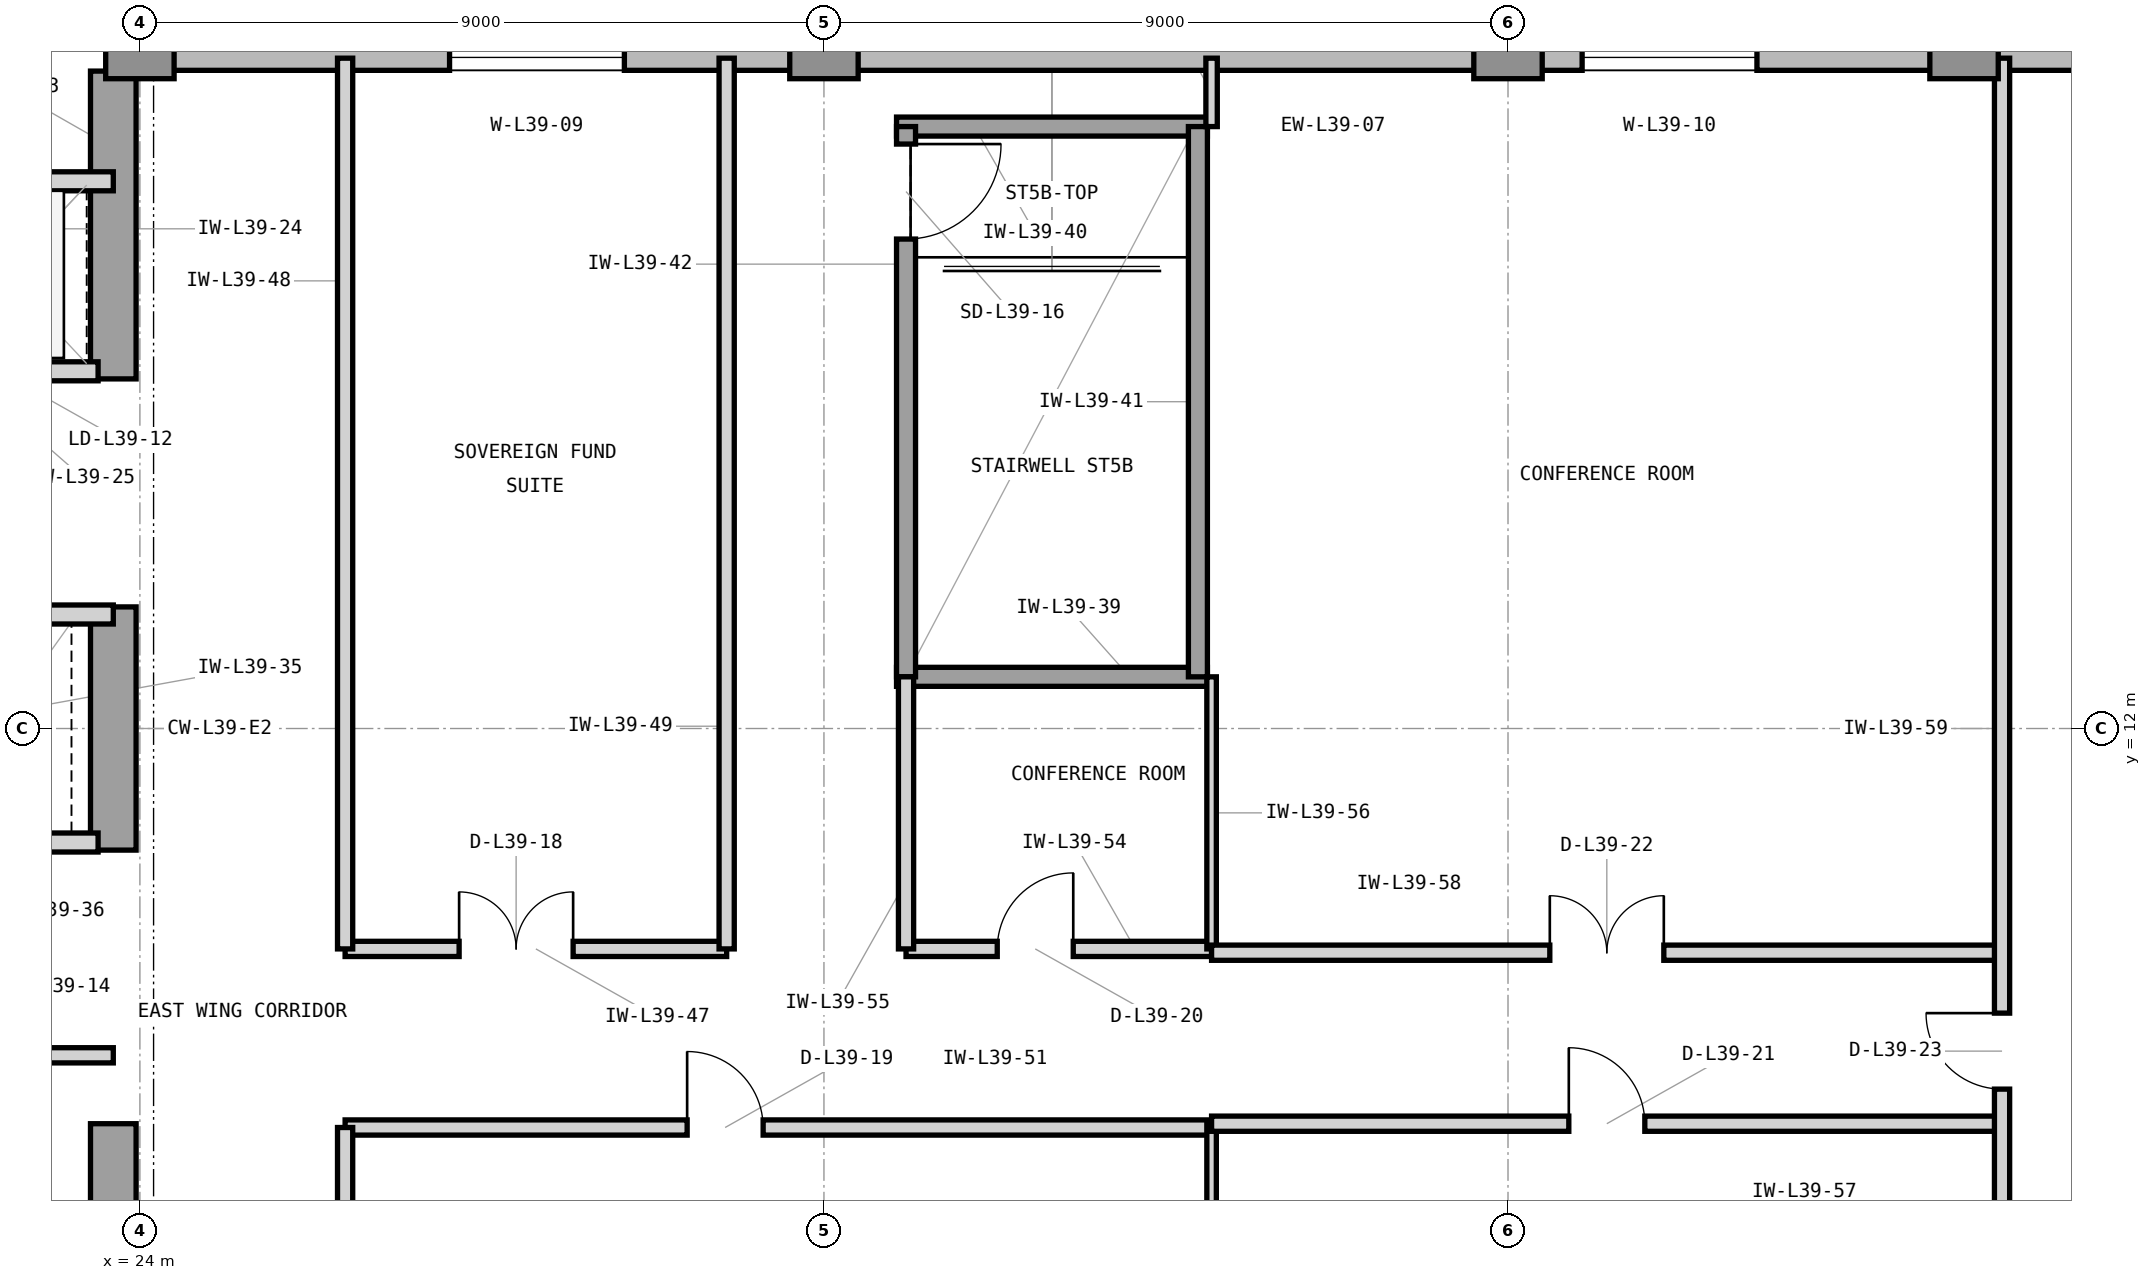
"""IFC4 building model, lengths in metres.
Left out: names, types, materials, properties, quantities, classifications, styles, units other than length and angle.
Written with IfcOpenShell. Run it as: python <this file> out.ifc"""

import sys

from ifc_helpers import new_model, si_unit, direction, frame, frame_2d, origin, origin_2d, place, context, subcontext, project, spatial, rectangle, extrude, element, fill, save


model = new_model("IFC4")
c1 = context("Model", 3, precision=1e-05, world=origin(), true_north=direction((0.0, 1.0)))
c2 = subcontext(c1, "Body", "Model", "MODEL_VIEW")
j1 = project(units=[si_unit("LENGTHUNIT", "METRE"), si_unit("PLANEANGLEUNIT", "RADIAN")], contexts=[c1])
p1 = place(None, origin())
s1 = spatial("IfcSite", under=j1, at=p1, CompositionType="ELEMENT")
p2 = place(p1, origin())
s2 = spatial("IfcBuilding", under=s1, at=p2, CompositionType="ELEMENT")
p3 = place(p2, frame((0.0, 0.0, 164.4)))
s3 = spatial("IfcBuildingStorey", under=s2, at=p3, CompositionType="ELEMENT", Elevation=164.4)
p4 = place(p3, frame((23.65, 3.65, 0.0), z_axis=(0.0, 0.0, 1.0), x_axis=(0.0, 1.0, 0.0)))
e1 = element("IfcWall", 1, at=p4, inside=s3, PredefinedType="SHEAR", context=c2, shape_type="SweptSolid", body=[
    extrude(rectangle(XDim=3.15, YDim=0.6, at=frame_2d((1.575, 0.0))), origin(), (0.0, 0.0, 1.0), 3.9),
])
p5 = place(p3, frame((23.65, 10.4, 0.0), z_axis=(0.0, 0.0, 1.0), x_axis=(0.0, 1.0, 0.0)))
e2 = element("IfcWall", 2, at=p5, inside=s3, PredefinedType="SHEAR", context=c2, shape_type="SweptSolid", body=[
    extrude(rectangle(XDim=3.2, YDim=0.6, at=frame_2d((1.6, 0.0))), origin(), (0.0, 0.0, 1.0), 3.9),
])
p6 = place(p3, frame((23.65, 16.6, 0.0), z_axis=(0.0, 0.0, 1.0), x_axis=(0.0, 1.0, 0.0)))
e3 = element("IfcWall", 3, at=p6, inside=s3, PredefinedType="SHEAR", context=c2, shape_type="SweptSolid", body=[
    extrude(rectangle(XDim=4.05, YDim=0.6, at=frame_2d((2.025, 0.0))), origin(), (0.0, 0.0, 1.0), 3.9),
])
for number, where, z_axis, x_axis in (
    (4, (24.0, 21.0, 0.0), (0.0, 0.0, 1.0), (1.0, 0.0, 0.0)),
    (5, (33.0, 21.0, 0.0), (0.0, 0.0, 1.0), (1.0, 0.0, 0.0)),
    (6, (42.0, 21.0, 0.0), (0.0, 0.0, 1.0), (1.0, 0.0, 0.0)),
    (7, (48.0, 21.0, 0.0), (0.0, 0.0, 1.0), (1.0, 0.0, 0.0)),
):
    element("IfcColumn", number, at=place(p3, frame(where, z_axis=z_axis, x_axis=x_axis)), inside=s3, PredefinedType="COLUMN", context=c2, shape_type="SweptSolid", body=[
        extrude(rectangle(XDim=0.9, YDim=0.9, at=origin_2d()), origin(), (0.0, 0.0, 1.0), 3.9),
    ])
p7 = place(p3, frame((55.4, 20.83, 0.0), z_axis=(0.0, 0.0, 1.0), x_axis=(-1.0, 0.0, 0.0)))
e8 = element("IfcWall", 8, at=p7, inside=s3, PredefinedType="STANDARD", context=c2, shape_type="SweptSolid", body=[
    extrude(rectangle(XDim=31.4, YDim=0.34, at=frame_2d((15.7, 0.0))), origin(), (0.0, 0.0, 1.0), 3.7),
])
p8 = place(p7, frame((25.026, 0.0, 0.9)))
e9 = element("IfcOpeningElement", 9, at=p8, cuts=e8, PredefinedType="OPENING", context=c2, shape_type="SweptSolid", body=[
    extrude(rectangle(XDim=2.3, YDim=2.2, at=frame_2d((1.15, 1.1))), frame((0.0, 0.18, 0.0), z_axis=(0.0, -1.0, 0.0), x_axis=(1.0, 0.0, 0.0)), (0.0, 0.0, 1.0), 0.36),
])
p9 = place(p7, frame((10.125, 0.0, 0.9)))
e10 = element("IfcOpeningElement", 10, at=p9, cuts=e8, PredefinedType="OPENING", context=c2, shape_type="SweptSolid", body=[
    extrude(rectangle(XDim=2.3, YDim=2.2, at=frame_2d((1.15, 1.1))), frame((0.0, 0.18, 0.0), z_axis=(0.0, -1.0, 0.0), x_axis=(1.0, 0.0, 0.0)), (0.0, 0.0, 1.0), 0.36),
])
p10 = place(p3, frame((21.05, 16.7, 0.0), z_axis=(0.0, 0.0, 1.0), x_axis=(1.0, 0.0, 0.0)))
e11 = element("IfcWall", 11, at=p10, inside=s3, PredefinedType="PARTITIONING", context=c2, shape_type="SweptSolid", body=[
    extrude(rectangle(XDim=2.4, YDim=0.25, at=frame_2d((1.2, 0.0))), origin(), (0.0, 0.0, 1.0), 3.283),
])
p11 = place(p10, frame((0.52, 0.0, 0.0)))
e12 = element("IfcOpeningElement", 12, at=p11, cuts=e11, PredefinedType="OPENING", context=c2, shape_type="SweptSolid", body=[
    extrude(rectangle(XDim=1.15, YDim=2.25, at=frame_2d((0.575, 1.125))), frame((0.0, 0.135, 0.0), z_axis=(0.0, -1.0, 0.0), x_axis=(1.0, 0.0, 0.0)), (0.0, 0.0, 1.0), 0.27),
])
p12 = place(p3, frame((16.45, 19.2, 0.0), z_axis=(0.0, 0.0, 1.0), x_axis=(1.0, 0.0, 0.0)))
e13 = element("IfcWall", 13, at=p12, inside=s3, PredefinedType="PARTITIONING", context=c2, shape_type="SweptSolid", body=[
    extrude(rectangle(XDim=7.2, YDim=0.25, at=frame_2d((3.6, 0.0))), origin(), (0.0, 0.0, 1.0), 3.69),
])
p13 = place(p3, frame((19.15, 7.7, 0.0), z_axis=(0.0, 0.0, 1.0), x_axis=(1.0, 0.0, 0.0)))
e14 = element("IfcWall", 14, at=p13, inside=s3, PredefinedType="PARTITIONING", context=c2, shape_type="SweptSolid", body=[
    extrude(rectangle(XDim=4.5, YDim=0.2, at=frame_2d((2.25, 0.0))), origin(), (0.0, 0.0, 1.0), 3.69),
])
p14 = place(p13, frame((1.75, 0.0, 0.0)))
e15 = element("IfcOpeningElement", 15, at=p14, cuts=e14, PredefinedType="OPENING", context=c2, shape_type="SweptSolid", body=[
    extrude(rectangle(XDim=1.0, YDim=2.15, at=frame_2d((0.5, 1.075))), frame((0.0, 0.11, 0.0), z_axis=(0.0, -1.0, 0.0), x_axis=(1.0, 0.0, 0.0)), (0.0, 0.0, 1.0), 0.22),
])
p15 = place(p3, frame((21.05, 10.5, 0.0), z_axis=(0.0, 0.0, 1.0), x_axis=(1.0, 0.0, 0.0)))
e16 = element("IfcWall", 16, at=p15, inside=s3, PredefinedType="PARTITIONING", context=c2, shape_type="SweptSolid", body=[
    extrude(rectangle(XDim=2.4, YDim=0.25, at=frame_2d((1.2, 0.0))), origin(), (0.0, 0.0, 1.0), 3.283),
])
p16 = place(p3, frame((14.7, 13.5, 0.0), z_axis=(0.0, 0.0, 1.0), x_axis=(1.0, 0.0, 0.0)))
e17 = element("IfcWall", 17, at=p16, inside=s3, PredefinedType="PARTITIONING", context=c2, shape_type="SweptSolid", body=[
    extrude(rectangle(XDim=8.95, YDim=0.25, at=frame_2d((4.475, 0.0))), origin(), (0.0, 0.0, 1.0), 3.283),
])
for number, where, z_axis, x_axis in (
    (18, (33.955, 12.68, 0.0), (0.0, 0.0, 1.0), (1.0, 0.0, 0.0)),
    (19, (33.955, 19.92, 0.0), (0.0, 0.0, 1.0), (1.0, 0.0, 0.0)),
):
    element("IfcWall", number, at=place(p3, frame(where, z_axis=z_axis, x_axis=x_axis)), inside=s3, PredefinedType="SHEAR", context=c2, shape_type="SweptSolid", body=[
        extrude(rectangle(XDim=4.09, YDim=0.25, at=frame_2d((2.045, 0.0))), origin(), (0.0, 0.0, 1.0), 3.9),
    ])
p17 = place(p3, frame((37.92, 12.68, 0.0), z_axis=(0.0, 0.0, 1.0), x_axis=(0.0, 1.0, 0.0)))
e20 = element("IfcWall", 20, at=p17, inside=s3, PredefinedType="SHEAR", context=c2, shape_type="SweptSolid", body=[
    extrude(rectangle(XDim=7.24, YDim=0.25, at=frame_2d((3.62, 0.0))), origin(), (0.0, 0.0, 1.0), 3.9),
])
p18 = place(p3, frame((34.08, 12.68, 0.0), z_axis=(0.0, 0.0, 1.0), x_axis=(0.0, 1.0, 0.0)))
e21 = element("IfcWall", 21, at=p18, inside=s3, PredefinedType="SHEAR", context=c2, shape_type="SweptSolid", body=[
    extrude(rectangle(XDim=7.24, YDim=0.25, at=frame_2d((3.62, 0.0))), origin(), (0.0, 0.0, 1.0), 3.9),
])
p19 = place(p18, frame((5.76, 0.0, 0.0)))
e22 = element("IfcOpeningElement", 22, at=p19, cuts=e21, PredefinedType="OPENING", context=c2, shape_type="SweptSolid", body=[
    extrude(rectangle(XDim=1.25, YDim=2.2, at=frame_2d((0.625, 1.1))), frame((0.0, 0.135, 0.0), z_axis=(0.0, -1.0, 0.0), x_axis=(1.0, 0.0, 0.0)), (0.0, 0.0, 1.0), 0.27),
])
p20 = place(p3, frame((26.7, 9.1, 0.0), z_axis=(0.0, 0.0, 1.0), x_axis=(1.0, 0.0, 0.0)))
e23 = element("IfcWall", 23, at=p20, inside=s3, PredefinedType="PARTITIONING", context=c2, shape_type="SweptSolid", body=[
    extrude(rectangle(XDim=5.02, YDim=0.2, at=frame_2d((2.51, 0.0))), origin(), (0.0, 0.0, 1.0), 3.69),
])
p21 = place(p20, frame((1.5, 0.0, 0.0)))
e24 = element("IfcOpeningElement", 24, at=p21, cuts=e23, PredefinedType="OPENING", context=c2, shape_type="SweptSolid", body=[
    extrude(rectangle(XDim=1.5, YDim=2.3, at=frame_2d((0.75, 1.15))), frame((0.0, 0.11, 0.0), z_axis=(0.0, -1.0, 0.0), x_axis=(1.0, 0.0, 0.0)), (0.0, 0.0, 1.0), 0.22),
])
for number, where, z_axis, x_axis in (
    (25, (26.7, 9.1, 0.0), (0.0, 0.0, 1.0), (0.0, 1.0, 0.0)),
    (26, (31.72, 9.1, 0.0), (0.0, 0.0, 1.0), (0.0, 1.0, 0.0)),
):
    element("IfcWall", number, at=place(p3, frame(where, z_axis=z_axis, x_axis=x_axis)), inside=s3, PredefinedType="PARTITIONING", context=c2, shape_type="SweptSolid", body=[
        extrude(rectangle(XDim=11.72, YDim=0.2, at=frame_2d((5.86, 0.0))), origin(), (0.0, 0.0, 1.0), 3.69),
    ])
p22 = place(p3, frame((38.1, 19.92, 0.0), z_axis=(0.0, 0.0, 1.0), x_axis=(0.0, 1.0, 0.0)))
e27 = element("IfcWall", 27, at=p22, inside=s3, PredefinedType="PARTITIONING", context=c2, shape_type="SweptSolid", body=[
    extrude(rectangle(XDim=0.9, YDim=0.15, at=frame_2d((0.45, 0.0))), origin(), (0.0, 0.0, 1.0), 3.69),
])
p23 = place(p3, frame((26.7, 6.75, 0.0), z_axis=(0.0, 0.0, 1.0), x_axis=(1.0, 0.0, 0.0)))
e28 = element("IfcWall", 28, at=p23, inside=s3, PredefinedType="PARTITIONING", context=c2, shape_type="SweptSolid", body=[
    extrude(rectangle(XDim=11.4, YDim=0.2, at=frame_2d((5.7, 0.0))), origin(), (0.0, 0.0, 1.0), 3.69),
])
p24 = place(p23, frame((4.5, 0.0, 0.0)))
e29 = element("IfcOpeningElement", 29, at=p24, cuts=e28, PredefinedType="OPENING", context=c2, shape_type="SweptSolid", body=[
    extrude(rectangle(XDim=1.0, YDim=2.15, at=frame_2d((0.5, 1.075))), frame((0.0, 0.11, 0.0), z_axis=(0.0, -1.0, 0.0), x_axis=(1.0, 0.0, 0.0)), (0.0, 0.0, 1.0), 0.22),
])
p25 = place(p3, frame((26.7, 3.18, 0.0), z_axis=(0.0, 0.0, 1.0), x_axis=(0.0, 1.0, 0.0)))
e30 = element("IfcWall", 30, at=p25, inside=s3, PredefinedType="PARTITIONING", context=c2, shape_type="SweptSolid", body=[
    extrude(rectangle(XDim=3.57, YDim=0.2, at=frame_2d((1.785, 0.0))), origin(), (0.0, 0.0, 1.0), 3.69),
])
p26 = place(p3, frame((38.1, 3.18, 0.0), z_axis=(0.0, 0.0, 1.0), x_axis=(0.0, 1.0, 0.0)))
e31 = element("IfcWall", 31, at=p26, inside=s3, PredefinedType="PARTITIONING", context=c2, shape_type="SweptSolid", body=[
    extrude(rectangle(XDim=3.62, YDim=0.125, at=frame_2d((1.81, 0.0))), origin(), (0.0, 0.0, 1.0), 3.69),
])
p27 = place(p3, frame((34.08, 9.1, 0.0), z_axis=(0.0, 0.0, 1.0), x_axis=(1.0, 0.0, 0.0)))
e32 = element("IfcWall", 32, at=p27, inside=s3, PredefinedType="PARTITIONING", context=c2, shape_type="SweptSolid", body=[
    extrude(rectangle(XDim=4.02, YDim=0.2, at=frame_2d((2.01, 0.0))), origin(), (0.0, 0.0, 1.0), 3.69),
])
p28 = place(p27, frame((1.2, 0.0, 0.0)))
e33 = element("IfcOpeningElement", 33, at=p28, cuts=e32, PredefinedType="OPENING", context=c2, shape_type="SweptSolid", body=[
    extrude(rectangle(XDim=1.0, YDim=2.15, at=frame_2d((0.5, 1.075))), frame((0.0, 0.11, 0.0), z_axis=(0.0, -1.0, 0.0), x_axis=(1.0, 0.0, 0.0)), (0.0, 0.0, 1.0), 0.22),
])
p29 = place(p3, frame((34.08, 9.1, 0.0), z_axis=(0.0, 0.0, 1.0), x_axis=(0.0, 1.0, 0.0)))
e34 = element("IfcWall", 34, at=p29, inside=s3, PredefinedType="PARTITIONING", context=c2, shape_type="SweptSolid", body=[
    extrude(rectangle(XDim=3.58, YDim=0.2, at=frame_2d((1.79, 0.0))), origin(), (0.0, 0.0, 1.0), 3.69),
])
p30 = place(p3, frame((38.1, 9.1, 0.0), z_axis=(0.0, 0.0, 1.0), x_axis=(0.0, 1.0, 0.0)))
e35 = element("IfcWall", 35, at=p30, inside=s3, PredefinedType="PARTITIONING", context=c2, shape_type="SweptSolid", body=[
    extrude(rectangle(XDim=3.58, YDim=0.125, at=frame_2d((1.79, 0.0))), origin(), (0.0, 0.0, 1.0), 3.69),
])
p31 = place(p3, frame((38.1, 6.8, 0.0), z_axis=(0.0, 0.0, 1.0), x_axis=(1.0, 0.0, 0.0)))
e36 = element("IfcWall", 36, at=p31, inside=s3, PredefinedType="PARTITIONING", context=c2, shape_type="SweptSolid", body=[
    extrude(rectangle(XDim=10.4, YDim=0.2, at=frame_2d((5.2, 0.0))), origin(), (0.0, 0.0, 1.0), 3.69),
])
p32 = place(p31, frame((4.7, 0.0, 0.0)))
e37 = element("IfcOpeningElement", 37, at=p32, cuts=e36, PredefinedType="OPENING", context=c2, shape_type="SweptSolid", body=[
    extrude(rectangle(XDim=1.0, YDim=2.15, at=frame_2d((0.5, 1.075))), frame((0.0, 0.11, 0.0), z_axis=(0.0, -1.0, 0.0), x_axis=(1.0, 0.0, 0.0)), (0.0, 0.0, 1.0), 0.22),
])
p33 = place(p3, frame((38.1, 9.05, 0.0), z_axis=(0.0, 0.0, 1.0), x_axis=(1.0, 0.0, 0.0)))
e38 = element("IfcWall", 38, at=p33, inside=s3, PredefinedType="PARTITIONING", context=c2, shape_type="SweptSolid", body=[
    extrude(rectangle(XDim=10.4, YDim=0.2, at=frame_2d((5.2, 0.0))), origin(), (0.0, 0.0, 1.0), 3.283),
])
p34 = place(p33, frame((4.45, 0.0, 0.0)))
e39 = element("IfcOpeningElement", 39, at=p34, cuts=e38, PredefinedType="OPENING", context=c2, shape_type="SweptSolid", body=[
    extrude(rectangle(XDim=1.5, YDim=2.3, at=frame_2d((0.75, 1.15))), frame((0.0, 0.11, 0.0), z_axis=(0.0, -1.0, 0.0), x_axis=(1.0, 0.0, 0.0)), (0.0, 0.0, 1.0), 0.22),
])
p35 = place(p3, frame((48.5, 3.18, 0.0), z_axis=(0.0, 0.0, 1.0), x_axis=(0.0, 1.0, 0.0)))
e40 = element("IfcWall", 40, at=p35, inside=s3, PredefinedType="PARTITIONING", context=c2, shape_type="SweptSolid", body=[
    extrude(rectangle(XDim=17.64, YDim=0.2, at=frame_2d((8.82, 0.0))), origin(), (0.0, 0.0, 1.0), 3.69),
])
p36 = place(p35, frame((4.075, 0.0, 0.0)))
e41 = element("IfcOpeningElement", 41, at=p36, cuts=e40, PredefinedType="OPENING", context=c2, shape_type="SweptSolid", body=[
    extrude(rectangle(XDim=1.0, YDim=2.15, at=frame_2d((0.5, 1.075))), frame((0.0, 0.11, 0.0), z_axis=(0.0, -1.0, 0.0), x_axis=(1.0, 0.0, 0.0)), (0.0, 0.0, 1.0), 0.22),
])
p37 = place(p19, frame((1.25, 0.0, 0.0), z_axis=(0.0, 0.0, 1.0), x_axis=(-1.0, 0.0, 0.0)))
e42 = element("IfcDoor", 42, at=p37, inside=s3, OperationType="SINGLE_SWING_LEFT", PredefinedType="DOOR", context=c2, shape_type="SweptSolid", body=[
    extrude(rectangle(XDim=1.25, YDim=2.2, at=frame_2d((0.625, 1.1))), frame((0.0, 0.025, 0.0), z_axis=(0.0, -1.0, 0.0), x_axis=(1.0, 0.0, 0.0)), (0.0, 0.0, 1.0), 0.05),
])
fill(e22, e42)
p38 = place(p21, origin())
e43 = element("IfcDoor", 43, at=p38, inside=s3, OperationType="DOUBLE_DOOR_SINGLE_SWING", PredefinedType="DOOR", context=c2, shape_type="SweptSolid", body=[
    extrude(rectangle(XDim=1.5, YDim=2.3, at=frame_2d((0.75, 1.15))), frame((0.0, 0.025, 0.0), z_axis=(0.0, -1.0, 0.0), x_axis=(1.0, 0.0, 0.0)), (0.0, 0.0, 1.0), 0.05),
])
fill(e24, e43)
p39 = place(p24, origin())
e44 = element("IfcDoor", 44, at=p39, inside=s3, OperationType="SINGLE_SWING_LEFT", PredefinedType="DOOR", context=c2, shape_type="SweptSolid", body=[
    extrude(rectangle(XDim=1.0, YDim=2.15, at=frame_2d((0.5, 1.075))), frame((0.0, 0.025, 0.0), z_axis=(0.0, -1.0, 0.0), x_axis=(1.0, 0.0, 0.0)), (0.0, 0.0, 1.0), 0.05),
])
fill(e29, e44)
p40 = place(p28, origin())
e45 = element("IfcDoor", 45, at=p40, inside=s3, OperationType="SINGLE_SWING_RIGHT", PredefinedType="DOOR", context=c2, shape_type="SweptSolid", body=[
    extrude(rectangle(XDim=1.0, YDim=2.15, at=frame_2d((0.5, 1.075))), frame((0.0, 0.025, 0.0), z_axis=(0.0, -1.0, 0.0), x_axis=(1.0, 0.0, 0.0)), (0.0, 0.0, 1.0), 0.05),
])
fill(e33, e45)
p41 = place(p32, origin())
e46 = element("IfcDoor", 46, at=p41, inside=s3, OperationType="SINGLE_SWING_LEFT", PredefinedType="DOOR", context=c2, shape_type="SweptSolid", body=[
    extrude(rectangle(XDim=1.0, YDim=2.15, at=frame_2d((0.5, 1.075))), frame((0.0, 0.025, 0.0), z_axis=(0.0, -1.0, 0.0), x_axis=(1.0, 0.0, 0.0)), (0.0, 0.0, 1.0), 0.05),
])
fill(e37, e46)
p42 = place(p34, origin())
e47 = element("IfcDoor", 47, at=p42, inside=s3, OperationType="DOUBLE_DOOR_SINGLE_SWING", PredefinedType="DOOR", context=c2, shape_type="SweptSolid", body=[
    extrude(rectangle(XDim=1.5, YDim=2.3, at=frame_2d((0.75, 1.15))), frame((0.0, 0.025, 0.0), z_axis=(0.0, -1.0, 0.0), x_axis=(1.0, 0.0, 0.0)), (0.0, 0.0, 1.0), 0.05),
])
fill(e39, e47)
p43 = place(p36, origin())
e48 = element("IfcDoor", 48, at=p43, inside=s3, OperationType="SINGLE_SWING_RIGHT", PredefinedType="DOOR", context=c2, shape_type="SweptSolid", body=[
    extrude(rectangle(XDim=1.0, YDim=2.15, at=frame_2d((0.5, 1.075))), frame((0.0, 0.025, 0.0), z_axis=(0.0, -1.0, 0.0), x_axis=(1.0, 0.0, 0.0)), (0.0, 0.0, 1.0), 0.05),
])
fill(e41, e48)
p44 = place(p8, origin())
e49 = element("IfcWindow", 49, at=p44, inside=s3, PartitioningType="SINGLE_PANEL", PredefinedType="WINDOW", context=c2, shape_type="SweptSolid", body=[
    extrude(rectangle(XDim=2.3, YDim=2.2, at=frame_2d((1.15, 1.1))), frame((0.0, 0.11, 0.0), z_axis=(0.0, -1.0, 0.0), x_axis=(1.0, 0.0, 0.0)), (0.0, 0.0, 1.0), 0.06),
])
fill(e9, e49)
p45 = place(p9, origin())
e50 = element("IfcWindow", 50, at=p45, inside=s3, PartitioningType="SINGLE_PANEL", PredefinedType="WINDOW", context=c2, shape_type="SweptSolid", body=[
    extrude(rectangle(XDim=2.3, YDim=2.2, at=frame_2d((1.15, 1.1))), frame((0.0, 0.11, 0.0), z_axis=(0.0, -1.0, 0.0), x_axis=(1.0, 0.0, 0.0)), (0.0, 0.0, 1.0), 0.06),
])
fill(e10, e50)
save(model, sys.argv[1])
